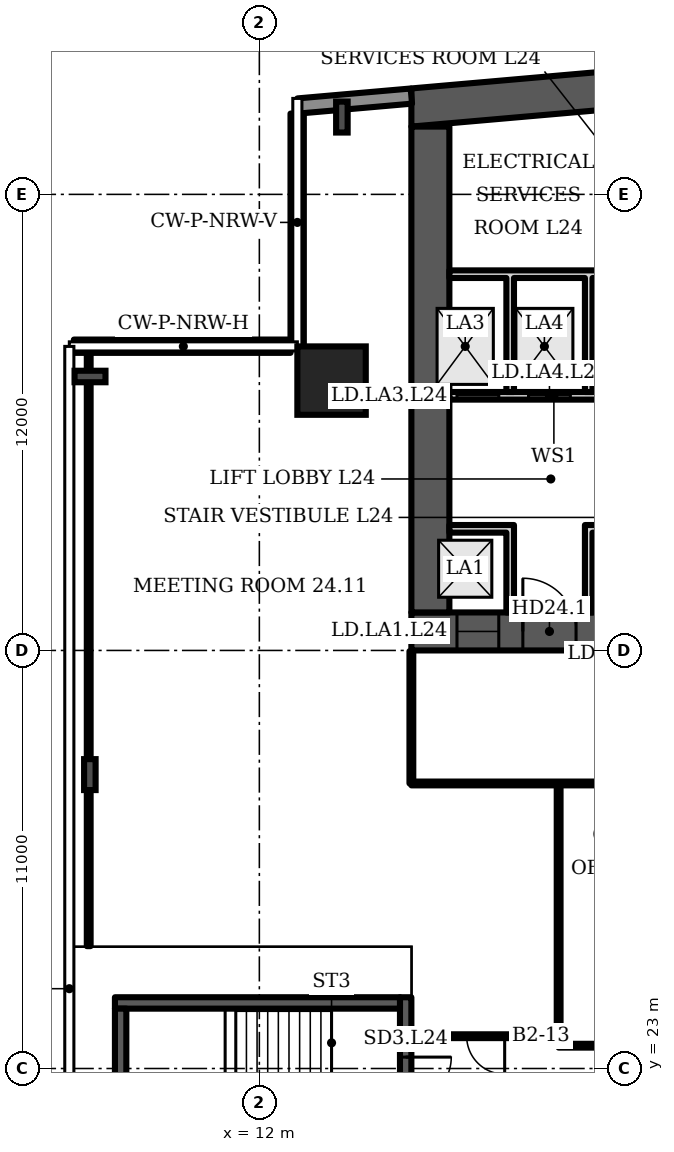
"""IFC4 building model, lengths in metres.
Left out: names, types, materials, properties, quantities, classifications, styles, units other than length and angle.
Written with IfcOpenShell. Run it as: python <this file> out.ifc"""

import sys

from ifc_helpers import new_model, si_unit, direction, frame, frame_2d, origin, origin_2d, place, context, subcontext, project, spatial, polyline, rectangle, i_section, outline, extrude, element, fill, save


model = new_model("IFC4")
c1 = context("Model", 3, precision=1e-05, world=origin(), true_north=direction((0.0, 1.0)))
c2 = subcontext(c1, "Body", "Model", "MODEL_VIEW")
j1 = project(units=[si_unit("LENGTHUNIT", "METRE"), si_unit("PLANEANGLEUNIT", "RADIAN")], contexts=[c1])
p1 = place(None, origin())
s1 = spatial("IfcSite", under=j1, at=p1, CompositionType="ELEMENT")
p2 = place(p1, origin())
s2 = spatial("IfcBuilding", under=s1, at=p2, CompositionType="ELEMENT")
p3 = place(p2, frame((0.0, 0.0, 107.5)))
s3 = spatial("IfcBuildingStorey", under=s2, at=p3, CompositionType="ELEMENT", Elevation=107.5)
p4 = place(p3, origin())
e1 = element("IfcWall", 1, at=p4, inside=s3, PredefinedType="SHEAR", context=c2, shape_type="SweptSolid", body=[
    extrude(outline(polyline([(16.0, 47.784), (40.5, 49.927), (65.0, 47.784), (65.0, 48.787), (40.5, 50.931), (16.0, 48.787), (16.0, 47.784)])), origin(), (0.0, 0.0, 1.0), 3.6),
])
p5 = place(p3, frame((16.0, 34.5, 0.0), z_axis=(0.0, 0.0, 1.0), x_axis=(1.0, 0.0, 0.0)))
e2 = element("IfcWall", 2, at=p5, inside=s3, PredefinedType="SHEAR", context=c2, shape_type="SweptSolid", body=[
    extrude(rectangle(XDim=49.0, YDim=1.0, at=frame_2d((24.5, 0.0))), origin(), (0.0, 0.0, 1.0), 3.6),
])
p6 = place(p5, frame((1.2, 0.0, 0.0)))
e3 = element("IfcOpeningElement", 3, at=p6, cuts=e2, PredefinedType="OPENING", context=c2, shape_type="SweptSolid", body=[
    extrude(rectangle(XDim=1.1, YDim=2.1, at=frame_2d((0.55, 1.05))), frame((0.0, 0.51, 0.0), z_axis=(0.0, -1.0, 0.0), x_axis=(1.0, 0.0, 0.0)), (0.0, 0.0, 1.0), 1.02),
])
p7 = place(p5, frame((5.083, 0.0, 0.0)))
e4 = element("IfcOpeningElement", 4, at=p7, cuts=e2, PredefinedType="OPENING", context=c2, shape_type="SweptSolid", body=[
    extrude(rectangle(XDim=1.1, YDim=2.1, at=frame_2d((0.55, 1.05))), frame((0.0, 0.51, 0.0), z_axis=(0.0, -1.0, 0.0), x_axis=(1.0, 0.0, 0.0)), (0.0, 0.0, 1.0), 1.02),
])
p8 = place(p5, frame((2.933, 0.0, 0.0)))
e5 = element("IfcOpeningElement", 5, at=p8, cuts=e2, PredefinedType="OPENING", context=c2, shape_type="SweptSolid", body=[
    extrude(rectangle(XDim=1.4, YDim=2.1, at=frame_2d((0.7, 1.05))), frame((0.0, 0.51, 0.0), z_axis=(0.0, -1.0, 0.0), x_axis=(1.0, 0.0, 0.0)), (0.0, 0.0, 1.0), 1.02),
])
p9 = place(p5, frame((7.65, 0.0, 0.0)))
e6 = element("IfcOpeningElement", 6, at=p9, cuts=e2, PredefinedType="OPENING", context=c2, shape_type="SweptSolid", body=[
    extrude(rectangle(XDim=1.2, YDim=2.1, at=frame_2d((0.6, 1.05))), frame((0.0, 0.51, 0.0), z_axis=(0.0, -1.0, 0.0), x_axis=(1.0, 0.0, 0.0)), (0.0, 0.0, 1.0), 1.02),
])
p10 = place(p5, frame((14.817, 0.0, 0.0)))
e7 = element("IfcOpeningElement", 7, at=p10, cuts=e2, PredefinedType="OPENING", context=c2, shape_type="SweptSolid", body=[
    extrude(rectangle(XDim=1.1, YDim=2.1, at=frame_2d((0.55, 1.05))), frame((0.0, 0.51, 0.0), z_axis=(0.0, -1.0, 0.0), x_axis=(1.0, 0.0, 0.0)), (0.0, 0.0, 1.0), 1.02),
])
p11 = place(p5, frame((19.083, 0.0, 0.0)))
e8 = element("IfcOpeningElement", 8, at=p11, cuts=e2, PredefinedType="OPENING", context=c2, shape_type="SweptSolid", body=[
    extrude(rectangle(XDim=1.1, YDim=2.1, at=frame_2d((0.55, 1.05))), frame((0.0, 0.51, 0.0), z_axis=(0.0, -1.0, 0.0), x_axis=(1.0, 0.0, 0.0)), (0.0, 0.0, 1.0), 1.02),
])
p12 = place(p5, frame((16.8, 0.0, 0.0)))
e9 = element("IfcOpeningElement", 9, at=p12, cuts=e2, PredefinedType="OPENING", context=c2, shape_type="SweptSolid", body=[
    extrude(rectangle(XDim=1.4, YDim=2.1, at=frame_2d((0.7, 1.05))), frame((0.0, 0.51, 0.0), z_axis=(0.0, -1.0, 0.0), x_axis=(1.0, 0.0, 0.0)), (0.0, 0.0, 1.0), 1.02),
])
p13 = place(p5, frame((21.817, 0.0, 0.0)))
e10 = element("IfcOpeningElement", 10, at=p13, cuts=e2, PredefinedType="OPENING", context=c2, shape_type="SweptSolid", body=[
    extrude(rectangle(XDim=1.1, YDim=2.1, at=frame_2d((0.55, 1.05))), frame((0.0, 0.51, 0.0), z_axis=(0.0, -1.0, 0.0), x_axis=(1.0, 0.0, 0.0)), (0.0, 0.0, 1.0), 1.02),
])
p14 = place(p5, frame((26.083, 0.0, 0.0)))
e11 = element("IfcOpeningElement", 11, at=p14, cuts=e2, PredefinedType="OPENING", context=c2, shape_type="SweptSolid", body=[
    extrude(rectangle(XDim=1.1, YDim=2.1, at=frame_2d((0.55, 1.05))), frame((0.0, 0.51, 0.0), z_axis=(0.0, -1.0, 0.0), x_axis=(1.0, 0.0, 0.0)), (0.0, 0.0, 1.0), 1.02),
])
p15 = place(p5, frame((33.15, 0.0, 0.0)))
e12 = element("IfcOpeningElement", 12, at=p15, cuts=e2, PredefinedType="OPENING", context=c2, shape_type="SweptSolid", body=[
    extrude(rectangle(XDim=1.2, YDim=2.1, at=frame_2d((0.6, 1.05))), frame((0.0, 0.51, 0.0), z_axis=(0.0, -1.0, 0.0), x_axis=(1.0, 0.0, 0.0)), (0.0, 0.0, 1.0), 1.02),
])
p16 = place(p5, frame((37.8, 0.0, 0.0)))
e13 = element("IfcOpeningElement", 13, at=p16, cuts=e2, PredefinedType="OPENING", context=c2, shape_type="SweptSolid", body=[
    extrude(rectangle(XDim=1.4, YDim=2.1, at=frame_2d((0.7, 1.05))), frame((0.0, 0.51, 0.0), z_axis=(0.0, -1.0, 0.0), x_axis=(1.0, 0.0, 0.0)), (0.0, 0.0, 1.0), 1.02),
])
p17 = place(p5, frame((42.817, 0.0, 0.0)))
e14 = element("IfcOpeningElement", 14, at=p17, cuts=e2, PredefinedType="OPENING", context=c2, shape_type="SweptSolid", body=[
    extrude(rectangle(XDim=1.1, YDim=2.1, at=frame_2d((0.55, 1.05))), frame((0.0, 0.51, 0.0), z_axis=(0.0, -1.0, 0.0), x_axis=(1.0, 0.0, 0.0)), (0.0, 0.0, 1.0), 1.02),
])
p18 = place(p5, frame((46.7, 0.0, 0.0)))
e15 = element("IfcOpeningElement", 15, at=p18, cuts=e2, PredefinedType="OPENING", context=c2, shape_type="SweptSolid", body=[
    extrude(rectangle(XDim=1.1, YDim=2.1, at=frame_2d((0.55, 1.05))), frame((0.0, 0.51, 0.0), z_axis=(0.0, -1.0, 0.0), x_axis=(1.0, 0.0, 0.0)), (0.0, 0.0, 1.0), 1.02),
])
p19 = place(p5, frame((44.667, 0.0, 0.0)))
e16 = element("IfcOpeningElement", 16, at=p19, cuts=e2, PredefinedType="OPENING", context=c2, shape_type="SweptSolid", body=[
    extrude(rectangle(XDim=1.4, YDim=2.1, at=frame_2d((0.7, 1.05))), frame((0.0, 0.51, 0.0), z_axis=(0.0, -1.0, 0.0), x_axis=(1.0, 0.0, 0.0)), (0.0, 0.0, 1.0), 1.02),
])
p20 = place(p3, frame((16.5, 35.0, 0.0), z_axis=(0.0, 0.0, 1.0), x_axis=(0.0, 1.0, 0.0)))
e17 = element("IfcWall", 17, at=p20, inside=s3, PredefinedType="SHEAR", context=c2, shape_type="SweptSolid", body=[
    extrude(rectangle(XDim=12.784, YDim=1.0, at=frame_2d((6.392, 0.0))), origin(), (0.0, 0.0, 1.0), 3.6),
])
p21 = place(p3, frame((13.9, 41.1, 0.0), z_axis=(0.0, 0.0, 1.0), x_axis=(1.0, 0.0, 0.0)))
e18 = element("IfcColumn", 18, at=p21, inside=s3, PredefinedType="COLUMN", context=c2, shape_type="SweptSolid", body=[
    extrude(rectangle(XDim=1.8, YDim=1.8, at=origin_2d()), origin(), (0.0, 0.0, 1.0), 3.6),
])
for number, where, z_axis, x_axis in (
    (19, (14.172, 48.034, 0.0), (0.0, 0.0, 1.0), (-1.0, 0.0, 0.0)),
    (20, (7.544, 41.208, 0.0), (0.0, 0.0, 1.0), (0.0, 1.0, 0.0)),
    (21, (7.54, 30.733, 0.0), (0.0, 0.0, 1.0), (-1.0, 0.0, 0.0)),
):
    element("IfcColumn", number, at=place(p3, frame(where, z_axis=z_axis, x_axis=x_axis)), inside=s3, PredefinedType="COLUMN", context=c2, shape_type="SweptSolid", body=[
        extrude(i_section(OverallWidth=0.303, OverallDepth=0.814, WebThickness=0.021, FlangeThickness=0.04, FilletRadius=0.03, at=origin_2d()), origin(), (0.0, 0.0, 1.0), 3.6),
    ])
p22 = place(p3, frame((16.0, 48.587, 0.0), z_axis=(0.0, 0.0, 1.0), x_axis=(-0.996194, -0.087168, 0.0)))
e22 = element("IfcWall", 22, at=p22, inside=s3, PredefinedType="SOLIDWALL", context=c2, shape_type="SweptSolid", body=[
    extrude(rectangle(XDim=2.994, YDim=0.4, at=frame_2d((1.497, 0.0))), origin(), (0.0, 0.0, 1.0), 3.2),
])
p23 = place(p3, frame((12.995, 48.126, 0.0), z_axis=(0.0, 0.0, 1.0), x_axis=(0.0, -1.0, 0.0)))
e23 = element("IfcWall", 23, at=p23, inside=s3, PredefinedType="SOLIDWALL", context=c2, shape_type="SweptSolid", body=[
    extrude(rectangle(XDim=6.126, YDim=0.35, at=frame_2d((3.063, 0.0))), origin(), (0.0, 0.0, 1.0), 1.0),
])
p24 = place(p3, frame((12.82, 42.005, 0.0), z_axis=(0.0, 0.0, 1.0), x_axis=(-1.0, 0.0, 0.0)))
e24 = element("IfcWall", 24, at=p24, inside=s3, PredefinedType="SOLIDWALL", context=c2, shape_type="SweptSolid", body=[
    extrude(rectangle(XDim=5.7, YDim=0.35, at=frame_2d((2.85, 0.0))), origin(), (0.0, 0.0, 1.0), 1.0),
])
p25 = place(p3, frame((17.0, 40.7, 0.0), z_axis=(0.0, 0.0, 1.0), x_axis=(1.0, 0.0, 0.0)))
e25 = element("IfcWall", 25, at=p25, inside=s3, PredefinedType="PARTITIONING", context=c2, shape_type="SweptSolid", body=[
    extrude(rectangle(XDim=5.5, YDim=0.2, at=frame_2d((2.75, 0.0))), origin(), (0.0, 0.0, 1.0), 3.2),
])
p26 = place(p25, frame((0.2, 0.0, 0.0)))
e26 = element("IfcOpeningElement", 26, at=p26, cuts=e25, PredefinedType="OPENING", context=c2, shape_type="SweptSolid", body=[
    extrude(rectangle(XDim=1.1, YDim=2.1, at=frame_2d((0.55, 1.05))), frame((0.0, 0.11, 0.0), z_axis=(0.0, -1.0, 0.0), x_axis=(1.0, 0.0, 0.0)), (0.0, 0.0, 1.0), 0.22),
])
p27 = place(p25, frame((2.083, 0.0, 0.0)))
e27 = element("IfcOpeningElement", 27, at=p27, cuts=e25, PredefinedType="OPENING", context=c2, shape_type="SweptSolid", body=[
    extrude(rectangle(XDim=1.1, YDim=2.1, at=frame_2d((0.55, 1.05))), frame((0.0, 0.11, 0.0), z_axis=(0.0, -1.0, 0.0), x_axis=(1.0, 0.0, 0.0)), (0.0, 0.0, 1.0), 0.22),
])
p28 = place(p25, frame((4.083, 0.0, 0.0)))
e28 = element("IfcOpeningElement", 28, at=p28, cuts=e25, PredefinedType="OPENING", context=c2, shape_type="SweptSolid", body=[
    extrude(rectangle(XDim=1.1, YDim=2.1, at=frame_2d((0.55, 1.05))), frame((0.0, 0.11, 0.0), z_axis=(0.0, -1.0, 0.0), x_axis=(1.0, 0.0, 0.0)), (0.0, 0.0, 1.0), 0.22),
])
p29 = place(p3, frame((0.0, 0.0, -0.0)))
e29 = element("IfcWall", 29, at=p29, inside=s3, PredefinedType="PARTITIONING", context=c2, shape_type="SweptSolid", body=[
    extrude(outline(polyline([(18.5, 37.1), (17.0, 37.1), (17.0, 37.3), (18.5, 37.3), (18.7, 37.3), (18.7, 35.0), (18.5, 35.0), (18.5, 37.1)])), origin(), (0.0, 0.0, 1.0), 3.2),
])
p30 = place(p3, frame((0.0, 0.0, -0.0)))
e30 = element("IfcWall", 30, at=p30, inside=s3, PredefinedType="PARTITIONING", context=c2, shape_type="SweptSolid", body=[
    extrude(outline(polyline([(20.567, 37.3), (20.767, 37.3), (22.5, 37.3), (22.5, 37.1), (20.767, 37.1), (20.767, 35.0), (20.567, 35.0), (20.567, 37.3)])), origin(), (0.0, 0.0, 1.0), 3.2),
])
p31 = place(p3, frame((0.0, 0.0, -0.0)))
e31 = element("IfcWall", 31, at=p31, inside=s3, PredefinedType="PARTITIONING", context=c2, shape_type="SweptSolid", body=[
    extrude(outline(polyline([(18.7, 40.8), (18.5, 40.8), (18.5, 43.8), (17.0, 43.8), (17.0, 44.0), (22.5, 44.0), (22.5, 43.8), (20.767, 43.8), (20.767, 40.8), (20.567, 40.8), (20.567, 43.8), (18.7, 43.8), (18.7, 40.8)])), origin(), (0.0, 0.0, 1.0), 3.2),
])
p32 = place(p3, frame((15.85, 20.525, 0.0), z_axis=(0.0, 0.0, 1.0), x_axis=(0.0, 1.0, 0.0)))
e32 = element("IfcWall", 32, at=p32, inside=s3, PredefinedType="SHEAR", context=c2, shape_type="SweptSolid", body=[
    extrude(rectangle(XDim=4.35, YDim=0.3, at=frame_2d((2.175, 0.0))), origin(), (0.0, 0.0, 1.0), 3.2),
])
p33 = place(p32, frame((1.575, 0.0, 0.0)))
e33 = element("IfcOpeningElement", 33, at=p33, cuts=e32, PredefinedType="OPENING", context=c2, shape_type="SweptSolid", body=[
    extrude(rectangle(XDim=1.2, YDim=2.1, at=frame_2d((0.6, 1.05))), frame((0.0, 0.16, 0.0), z_axis=(0.0, -1.0, 0.0), x_axis=(1.0, 0.0, 0.0)), (0.0, 0.0, 1.0), 0.32),
])
p34 = place(p3, frame((7.51, 26.22, 0.0), z_axis=(0.0, 0.0, 1.0), x_axis=(0.0, 1.0, 0.0)))
e34 = element("IfcWall", 34, at=p34, inside=s3, PredefinedType="PARTITIONING", context=c2, shape_type="SweptSolid", body=[
    extrude(rectangle(XDim=15.76, YDim=0.1, at=frame_2d((7.88, 0.0))), origin(), (0.0, 0.0, 1.0), 2.58),
])
p35 = place(p3, frame((16.0, 30.5, 0.0), z_axis=(0.0, 0.0, 1.0), x_axis=(0.0, 1.0, 0.0)))
e35 = element("IfcWall", 35, at=p35, inside=s3, PredefinedType="PARTITIONING", context=c2, shape_type="SweptSolid", body=[
    extrude(rectangle(XDim=3.48, YDim=0.1, at=frame_2d((1.74, 0.0))), origin(), (0.0, 0.0, 1.0), 3.2),
])
p36 = place(p3, frame((16.0, 30.5, 0.0), z_axis=(0.0, 0.0, 1.0), x_axis=(1.0, 0.0, 0.0)))
e36 = element("IfcWall", 36, at=p36, inside=s3, PredefinedType="PARTITIONING", context=c2, shape_type="SweptSolid", body=[
    extrude(rectangle(XDim=20.85, YDim=0.1, at=frame_2d((10.425, 0.0))), origin(), (0.0, 0.0, 1.0), 3.2),
])
p37 = place(p36, frame((6.895, 0.0, 0.0)))
e37 = element("IfcOpeningElement", 37, at=p37, cuts=e36, PredefinedType="OPENING", context=c2, shape_type="SweptSolid", body=[
    extrude(rectangle(XDim=1.0, YDim=2.1, at=frame_2d((0.5, 1.05))), frame((0.0, 0.06, 0.0), z_axis=(0.0, -1.0, 0.0), x_axis=(1.0, 0.0, 0.0)), (0.0, 0.0, 1.0), 0.12),
])
p38 = place(p36, frame((15.37, 0.0, 0.0)))
e38 = element("IfcOpeningElement", 38, at=p38, cuts=e36, PredefinedType="OPENING", context=c2, shape_type="SweptSolid", body=[
    extrude(rectangle(XDim=1.0, YDim=2.1, at=frame_2d((0.5, 1.05))), frame((0.0, 0.06, 0.0), z_axis=(0.0, -1.0, 0.0), x_axis=(1.0, 0.0, 0.0)), (0.0, 0.0, 1.0), 0.12),
])
p39 = place(p3, frame((16.02, 23.85, 0.0), z_axis=(0.0, 0.0, 1.0), x_axis=(1.0, 0.0, 0.0)))
e39 = element("IfcWall", 39, at=p39, inside=s3, PredefinedType="PARTITIONING", context=c2, shape_type="SweptSolid", body=[
    extrude(rectangle(XDim=3.855, YDim=0.1, at=frame_2d((1.927, 0.0))), origin(), (0.0, 0.0, 1.0), 3.2),
])
p40 = place(p39, frame((1.435, 0.0, 0.0)))
e40 = element("IfcOpeningElement", 40, at=p40, cuts=e39, PredefinedType="OPENING", context=c2, shape_type="SweptSolid", body=[
    extrude(rectangle(XDim=1.0, YDim=2.1, at=frame_2d((0.5, 1.05))), frame((0.0, 0.06, 0.0), z_axis=(0.0, -1.0, 0.0), x_axis=(1.0, 0.0, 0.0)), (0.0, 0.0, 1.0), 0.12),
])
p41 = place(p3, frame((19.875, 23.6, 0.0), z_axis=(0.0, 0.0, 1.0), x_axis=(0.0, 1.0, 0.0)))
e41 = element("IfcWall", 41, at=p41, inside=s3, PredefinedType="PARTITIONING", context=c2, shape_type="SweptSolid", body=[
    extrude(rectangle(XDim=6.9, YDim=0.1, at=frame_2d((3.45, 0.0))), origin(), (0.0, 0.0, 1.0), 3.2),
])
p42 = place(p3, frame((19.875, 23.6, 0.0), z_axis=(0.0, 0.0, 1.0), x_axis=(1.0, 0.0, 0.0)))
e42 = element("IfcWall", 42, at=p42, inside=s3, PredefinedType="PARTITIONING", context=c2, shape_type="SweptSolid", body=[
    extrude(rectangle(XDim=1.325, YDim=0.1, at=frame_2d((0.663, 0.0))), origin(), (0.0, 0.0, 1.0), 3.2),
])
p43 = place(p3, frame((8.2, 24.725, 0.0), z_axis=(0.0, 0.0, 1.0), x_axis=(1.0, 0.0, 0.0)))
e43 = element("IfcWall", 43, at=p43, inside=s3, PredefinedType="SHEAR", context=c2, shape_type="SweptSolid", body=[
    extrude(rectangle(XDim=7.5, YDim=0.3, at=frame_2d((3.75, 0.0))), origin(), (0.0, 0.0, 1.0), 3.2),
])
p44 = place(p3, frame((8.35, 20.825, 0.0), z_axis=(0.0, 0.0, 1.0), x_axis=(0.0, 1.0, 0.0)))
e44 = element("IfcWall", 44, at=p44, inside=s3, PredefinedType="SHEAR", context=c2, shape_type="SweptSolid", body=[
    extrude(rectangle(XDim=3.75, YDim=0.3, at=frame_2d((1.875, 0.0))), origin(), (0.0, 0.0, 1.0), 3.2),
])
p45 = place(p6, origin())
e45 = element("IfcDoor", 45, at=p45, inside=s3, OperationType="DOUBLE_DOOR_SLIDING", PredefinedType="DOOR", context=c2, shape_type="SweptSolid", body=[
    extrude(rectangle(XDim=1.1, YDim=2.1, at=frame_2d((0.55, 1.05))), frame((0.0, 0.025, 0.0), z_axis=(0.0, -1.0, 0.0), x_axis=(1.0, 0.0, 0.0)), (0.0, 0.0, 1.0), 0.05),
])
fill(e3, e45)
p46 = place(p8, origin())
e46 = element("IfcDoor", 46, at=p46, inside=s3, OperationType="DOUBLE_DOOR_SINGLE_SWING", PredefinedType="DOOR", context=c2, shape_type="SweptSolid", body=[
    extrude(rectangle(XDim=1.4, YDim=2.1, at=frame_2d((0.7, 1.05))), frame((0.0, 0.025, 0.0), z_axis=(0.0, -1.0, 0.0), x_axis=(1.0, 0.0, 0.0)), (0.0, 0.0, 1.0), 0.05),
])
fill(e5, e46)
p47 = place(p26, origin())
e47 = element("IfcDoor", 47, at=p47, inside=s3, OperationType="DOUBLE_DOOR_SLIDING", PredefinedType="DOOR", context=c2, shape_type="SweptSolid", body=[
    extrude(rectangle(XDim=1.1, YDim=2.1, at=frame_2d((0.55, 1.05))), frame((0.0, 0.025, 0.0), z_axis=(0.0, -1.0, 0.0), x_axis=(1.0, 0.0, 0.0)), (0.0, 0.0, 1.0), 0.05),
])
fill(e26, e47)
p48 = place(p27, origin())
e48 = element("IfcDoor", 48, at=p48, inside=s3, OperationType="DOUBLE_DOOR_SLIDING", PredefinedType="DOOR", context=c2, shape_type="SweptSolid", body=[
    extrude(rectangle(XDim=1.1, YDim=2.1, at=frame_2d((0.55, 1.05))), frame((0.0, 0.025, 0.0), z_axis=(0.0, -1.0, 0.0), x_axis=(1.0, 0.0, 0.0)), (0.0, 0.0, 1.0), 0.05),
])
fill(e27, e48)
p49 = place(p33, origin())
e49 = element("IfcDoor", 49, at=p49, inside=s3, OperationType="SINGLE_SWING_RIGHT", PredefinedType="DOOR", context=c2, shape_type="SweptSolid", body=[
    extrude(rectangle(XDim=1.2, YDim=2.1, at=frame_2d((0.6, 1.05))), frame((0.0, 0.025, 0.0), z_axis=(0.0, -1.0, 0.0), x_axis=(1.0, 0.0, 0.0)), (0.0, 0.0, 1.0), 0.05),
])
fill(e33, e49)
p50 = place(p40, origin())
e50 = element("IfcDoor", 50, at=p50, inside=s3, OperationType="SINGLE_SWING_RIGHT", PredefinedType="DOOR", context=c2, shape_type="SweptSolid", body=[
    extrude(rectangle(XDim=1.0, YDim=2.1, at=frame_2d((0.5, 1.05))), frame((0.0, 0.025, 0.0), z_axis=(0.0, -1.0, 0.0), x_axis=(1.0, 0.0, 0.0)), (0.0, 0.0, 1.0), 0.05),
])
fill(e40, e50)
save(model, sys.argv[1])
